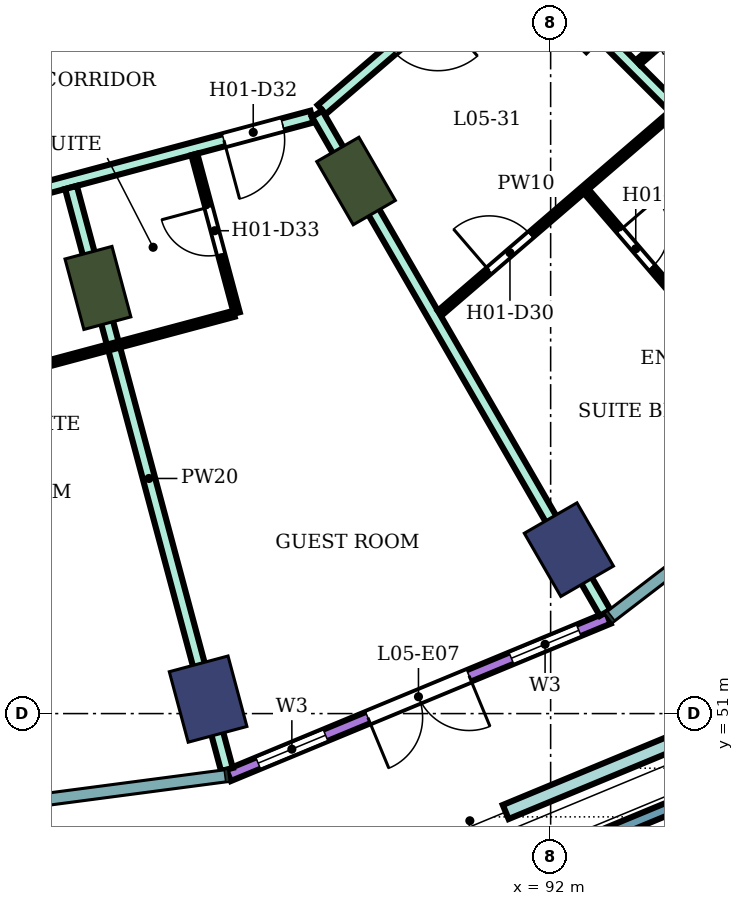
"""IFC4 building model, lengths in metres.
Left out: names, types, materials, properties, quantities, classifications, styles, units other than length and angle.
Written with IfcOpenShell. Run it as: python <this file> out.ifc"""

import sys

from ifc_helpers import new_model, si_unit, direction, frame, frame_2d, origin, origin_2d, place, context, subcontext, project, spatial, rectangle, extrude, element, fill, save


model = new_model("IFC4")
c1 = context("Model", 3, precision=1e-05, world=origin(), true_north=direction((0.0, 1.0)))
c2 = subcontext(c1, "Body", "Model", "MODEL_VIEW")
j1 = project(units=[si_unit("LENGTHUNIT", "METRE"), si_unit("PLANEANGLEUNIT", "RADIAN")], contexts=[c1])
p1 = place(None, origin())
s1 = spatial("IfcSite", under=j1, at=p1, CompositionType="ELEMENT")
p2 = place(p1, origin())
s2 = spatial("IfcBuilding", under=s1, at=p2, CompositionType="ELEMENT")
p3 = place(p2, frame((0.0, 0.0, 28.8)))
s3 = spatial("IfcBuildingStorey", under=s2, at=p3, CompositionType="ELEMENT", Elevation=28.8)
for number, where, z_axis, x_axis in (
    (1, (86.367, 51.238, 0.0), (0.0, 0.0, 1.0), (0.259, -0.966, 0.0)),
    (2, (92.3, 53.696, 0.0), (0.0, 0.0, 1.0), (0.5, -0.866, 0.0)),
):
    element("IfcColumn", number, at=place(p3, frame(where, z_axis=z_axis, x_axis=x_axis)), inside=s3, PredefinedType="COLUMN", context=c2, shape_type="SweptSolid", body=[
        extrude(rectangle(XDim=1.2, YDim=1.0, at=origin_2d()), origin(), (0.0, 0.0, 1.0), 3.8),
    ])
for number, where, z_axis, x_axis in (
    (3, (84.555, 58.0, 0.0), (0.0, 0.0, 1.0), (0.259, -0.966, 0.0)),
    (4, (88.8, 59.758, 0.0), (0.0, 0.0, 1.0), (0.5, -0.866, 0.0)),
    (5, (92.445, 62.555, 0.0), (0.0, 0.0, 1.0), (0.707, -0.707, 0.0)),
):
    element("IfcColumn", number, at=place(p3, frame(where, z_axis=z_axis, x_axis=x_axis)), inside=s3, PredefinedType="COLUMN", context=c2, shape_type="SweptSolid", body=[
        extrude(rectangle(XDim=1.2, YDim=0.8, at=origin_2d()), origin(), (0.0, 0.0, 1.0), 3.8),
    ])
p4 = place(p3, frame((86.703, 49.983, 0.0), z_axis=(0.0, 0.0, 1.0), x_axis=(0.923875115043, 0.382694096902, 0.0)))
e6 = element("IfcWall", 6, at=p4, inside=s3, PredefinedType="NOTDEFINED", context=c2, shape_type="SweptSolid", body=[
    extrude(rectangle(XDim=6.761, YDim=0.2, at=frame_2d((3.38, 0.0))), origin(), (0.0, 0.0, 1.0), 3.8),
])
p5 = place(p4, frame((0.527, 0.0, 0.9)))
e7 = element("IfcOpeningElement", 7, at=p5, cuts=e6, PredefinedType="OPENING", context=c2, shape_type="SweptSolid", body=[
    extrude(rectangle(XDim=1.2, YDim=2.4, at=frame_2d((0.6, 1.2))), frame((0.0, 0.11, 0.0), z_axis=(0.0, -1.0, 0.0), x_axis=(1.0, 0.0, 0.0)), (0.0, 0.0, 1.0), 0.22),
])
p6 = place(p4, frame((2.48, 0.0, 0.0)))
e8 = element("IfcOpeningElement", 8, at=p6, cuts=e6, PredefinedType="OPENING", context=c2, shape_type="SweptSolid", body=[
    extrude(rectangle(XDim=1.8, YDim=2.4, at=frame_2d((0.9, 1.2))), frame((0.0, 0.11, 0.0), z_axis=(0.0, -1.0, 0.0), x_axis=(1.0, 0.0, 0.0)), (0.0, 0.0, 1.0), 0.22),
])
p7 = place(p4, frame((5.034, 0.0, 0.9)))
e9 = element("IfcOpeningElement", 9, at=p7, cuts=e6, PredefinedType="OPENING", context=c2, shape_type="SweptSolid", body=[
    extrude(rectangle(XDim=1.2, YDim=2.4, at=frame_2d((0.6, 1.2))), frame((0.0, 0.11, 0.0), z_axis=(0.0, -1.0, 0.0), x_axis=(1.0, 0.0, 0.0)), (0.0, 0.0, 1.0), 0.22),
])
p8 = place(p3, frame((94.586, 49.709, 0.0), z_axis=(0.0, 0.0, 1.0), x_axis=(-0.923876582616, -0.382690553965, 0.0)))
e10 = element("IfcWall", 10, at=p8, inside=s3, PredefinedType="PARAPET", context=c2, shape_type="SweptSolid", body=[
    extrude(rectangle(XDim=7.595, YDim=0.2, at=frame_2d((3.798, 0.0))), origin(), (0.0, 0.0, 1.0), 1.1),
])
p9 = place(p3, frame((94.094, 50.555, 0.0), z_axis=(0.0, 0.0, 1.0), x_axis=(-0.923849931538, -0.38275488762, 0.0)))
e11 = element("IfcWall", 11, at=p9, inside=s3, PredefinedType="USERDEFINED", context=c2, shape_type="SweptSolid", body=[
    extrude(rectangle(XDim=3.067, YDim=0.25, at=frame_2d((1.533, 0.0))), origin(), (0.0, 0.0, 1.0), 0.6),
])
p10 = place(p3, frame((80.0, 58.655, 0.0), z_axis=(0.0, 0.0, 1.0), x_axis=(0.965974635626, 0.258636817424, 0.0)))
e12 = element("IfcWall", 12, at=p10, inside=s3, PredefinedType="PARTITIONING", context=c2, shape_type="SweptSolid", body=[
    extrude(rectangle(XDim=8.36, YDim=0.2, at=frame_2d((4.18, 0.0))), origin(), (0.0, 0.0, 1.0), 3.35),
])
p11 = place(p10, frame((6.86, 0.0, 0.0)))
e13 = element("IfcOpeningElement", 13, at=p11, cuts=e12, PredefinedType="OPENING", context=c2, shape_type="SweptSolid", body=[
    extrude(rectangle(XDim=1.0, YDim=2.1, at=frame_2d((0.5, 1.05))), frame((0.0, 0.11, 0.0), z_axis=(0.0, -1.0, 0.0), x_axis=(1.0, 0.0, 0.0)), (0.0, 0.0, 1.0), 0.22),
])
p12 = place(p10, frame((0.55, 0.0, 0.0)))
e14 = element("IfcOpeningElement", 14, at=p12, cuts=e12, PredefinedType="OPENING", context=c2, shape_type="SweptSolid", body=[
    extrude(rectangle(XDim=1.0, YDim=2.1, at=frame_2d((0.5, 1.05))), frame((0.0, 0.11, 0.0), z_axis=(0.0, -1.0, 0.0), x_axis=(1.0, 0.0, 0.0)), (0.0, 0.0, 1.0), 0.22),
])
p13 = place(p3, frame((80.0, 61.346, 0.0), z_axis=(0.0, 0.0, 1.0), x_axis=(0.965924181808, 0.258825182312, 0.0)))
e15 = element("IfcWall", 15, at=p13, inside=s3, PredefinedType="PARTITIONING", context=c2, shape_type="SweptSolid", body=[
    extrude(rectangle(XDim=6.94, YDim=0.2, at=frame_2d((3.47, 0.0))), origin(), (0.0, 0.0, 1.0), 3.35),
])
p14 = place(p13, frame((0.55, 0.0, 0.0)))
e16 = element("IfcOpeningElement", 16, at=p14, cuts=e15, PredefinedType="OPENING", context=c2, shape_type="SweptSolid", body=[
    extrude(rectangle(XDim=1.0, YDim=2.1, at=frame_2d((0.5, 1.05))), frame((0.0, 0.11, 0.0), z_axis=(0.0, -1.0, 0.0), x_axis=(1.0, 0.0, 0.0)), (0.0, 0.0, 1.0), 0.22),
])
p15 = place(p3, frame((84.112, 59.652, 0.0), z_axis=(0.0, 0.0, 1.0), x_axis=(0.258791091927, -0.965933315886, 0.0)))
e17 = element("IfcWall", 17, at=p15, inside=s3, PredefinedType="PARTITIONING", context=c2, shape_type="SweptSolid", body=[
    extrude(rectangle(XDim=9.909, YDim=0.2, at=frame_2d((4.955, 0.0))), origin(), (0.0, 0.0, 1.0), 3.35),
])
p16 = place(p3, frame((88.235, 60.931, 0.0), z_axis=(0.0, 0.0, 1.0), x_axis=(0.758799498714, 0.651324282329, 0.0)))
e18 = element("IfcWall", 18, at=p16, inside=s3, PredefinedType="PARTITIONING", context=c2, shape_type="SweptSolid", body=[
    extrude(rectangle(XDim=6.186, YDim=0.2, at=frame_2d((3.093, 0.0))), origin(), (0.0, 0.0, 1.0), 3.35),
])
p17 = place(p16, frame((1.519, 0.0, 0.0)))
e19 = element("IfcOpeningElement", 19, at=p17, cuts=e18, PredefinedType="OPENING", context=c2, shape_type="SweptSolid", body=[
    extrude(rectangle(XDim=1.0, YDim=2.1, at=frame_2d((0.5, 1.05))), frame((0.0, 0.11, 0.0), z_axis=(0.0, -1.0, 0.0), x_axis=(1.0, 0.0, 0.0)), (0.0, 0.0, 1.0), 0.22),
])
p18 = place(p3, frame((88.16, 60.863, 0.0), z_axis=(0.0, 0.0, 1.0), x_axis=(0.499946996988, -0.866056002925, 0.0)))
e20 = element("IfcWall", 20, at=p18, inside=s3, PredefinedType="PARTITIONING", context=c2, shape_type="SweptSolid", body=[
    extrude(rectangle(XDim=9.475, YDim=0.2, at=frame_2d((4.737, 0.0))), origin(), (0.0, 0.0, 1.0), 3.35),
])
p19 = place(p3, frame((91.449, 63.548, 0.0), z_axis=(0.0, 0.0, 1.0), x_axis=(0.706984804638, -0.707228736698, 0.0)))
e21 = element("IfcWall", 21, at=p19, inside=s3, PredefinedType="PARTITIONING", context=c2, shape_type="SweptSolid", body=[
    extrude(rectangle(XDim=7.006, YDim=0.2, at=frame_2d((3.503, 0.0))), origin(), (0.0, 0.0, 1.0), 3.35),
])
p20 = place(p3, frame((82.782, 56.501, 0.0), z_axis=(0.0, 0.0, 1.0), x_axis=(0.965999228418, 0.258544949083, 0.0)))
e22 = element("IfcWall", 22, at=p20, inside=s3, PredefinedType="PARTITIONING", context=c2, shape_type="SweptSolid", body=[
    extrude(rectangle(XDim=4.15, YDim=0.1, at=frame_2d((2.075, 0.0))), origin(), (0.0, 0.0, 1.0), 3.35),
])
p21 = place(p3, frame((86.14, 60.196, 0.0), z_axis=(0.0, 0.0, 1.0), x_axis=(0.258945475746, -0.965891940432, 0.0)))
e23 = element("IfcWall", 23, at=p21, inside=s3, PredefinedType="PARTITIONING", context=c2, shape_type="SweptSolid", body=[
    extrude(rectangle(XDim=2.7, YDim=0.1, at=frame_2d((1.35, 0.0))), origin(), (0.0, 0.0, 1.0), 3.35),
])
p22 = place(p21, frame((0.9, 0.0, 0.0)))
e24 = element("IfcOpeningElement", 24, at=p22, cuts=e23, PredefinedType="OPENING", context=c2, shape_type="SweptSolid", body=[
    extrude(rectangle(XDim=0.8, YDim=2.1, at=frame_2d((0.4, 1.05))), frame((0.0, 0.06, 0.0), z_axis=(0.0, -1.0, 0.0), x_axis=(1.0, 0.0, 0.0)), (0.0, 0.0, 1.0), 0.12),
])
p23 = place(p3, frame((90.178, 57.587, 0.0), z_axis=(0.0, 0.0, 1.0), x_axis=(0.758140003227, 0.652091815243, 0.0)))
e25 = element("IfcWall", 25, at=p23, inside=s3, PredefinedType="PARTITIONING", context=c2, shape_type="SweptSolid", body=[
    extrude(rectangle(XDim=5.021, YDim=0.1, at=frame_2d((2.51, 0.0))), origin(), (0.0, 0.0, 1.0), 3.35),
])
p24 = place(p23, frame((1.071, 0.0, 0.0)))
e26 = element("IfcOpeningElement", 26, at=p24, cuts=e25, PredefinedType="OPENING", context=c2, shape_type="SweptSolid", body=[
    extrude(rectangle(XDim=0.9, YDim=2.1, at=frame_2d((0.45, 1.05))), frame((0.0, 0.06, 0.0), z_axis=(0.0, -1.0, 0.0), x_axis=(1.0, 0.0, 0.0)), (0.0, 0.0, 1.0), 0.12),
])
p25 = place(p3, frame((92.585, 59.591, 0.0), z_axis=(0.0, 0.0, 1.0), x_axis=(0.652011200591, -0.758209334092, 0.0)))
e27 = element("IfcWall", 27, at=p25, inside=s3, PredefinedType="PARTITIONING", context=c2, shape_type="SweptSolid", body=[
    extrude(rectangle(XDim=2.8, YDim=0.1, at=frame_2d((1.4, 0.0))), origin(), (0.0, 0.0, 1.0), 3.35),
])
p26 = place(p25, frame((0.85, 0.0, 0.0)))
e28 = element("IfcOpeningElement", 28, at=p26, cuts=e27, PredefinedType="OPENING", context=c2, shape_type="SweptSolid", body=[
    extrude(rectangle(XDim=0.8, YDim=2.1, at=frame_2d((0.4, 1.05))), frame((0.0, 0.06, 0.0), z_axis=(0.0, -1.0, 0.0), x_axis=(1.0, 0.0, 0.0)), (0.0, 0.0, 1.0), 0.12),
])
p27 = place(p3, frame((93.435, 61.707, 0.0), z_axis=(0.0, 0.0, 1.0), x_axis=(0.758070495124, 0.652172618578, 0.0)))
e29 = element("IfcWall", 29, at=p27, inside=s3, PredefinedType="PARTITIONING", context=c2, shape_type="SweptSolid", body=[
    extrude(rectangle(XDim=1.789, YDim=0.1, at=frame_2d((0.895, 0.0))), origin(), (0.0, 0.0, 1.0), 3.35),
])
p28 = place(p5, origin())
e30 = element("IfcWindow", 30, at=p28, inside=s3, PartitioningType="SINGLE_PANEL", PredefinedType="WINDOW", context=c2, shape_type="SweptSolid", body=[
    extrude(rectangle(XDim=1.2, YDim=2.4, at=frame_2d((0.6, 1.2))), frame((0.0, 0.03, 0.0), z_axis=(0.0, -1.0, 0.0), x_axis=(1.0, 0.0, 0.0)), (0.0, 0.0, 1.0), 0.06),
])
fill(e7, e30)
p29 = place(p6, frame((1.8, 0.0, 0.0), z_axis=(0.0, 0.0, 1.0), x_axis=(-1.0, 0.0, 0.0)))
e31 = element("IfcDoor", 31, at=p29, inside=s3, OperationType="DOUBLE_DOOR_SINGLE_SWING", PredefinedType="DOOR", context=c2, shape_type="SweptSolid", body=[
    extrude(rectangle(XDim=1.8, YDim=2.4, at=frame_2d((0.9, 1.2))), frame((0.0, 0.025, 0.0), z_axis=(0.0, -1.0, 0.0), x_axis=(1.0, 0.0, 0.0)), (0.0, 0.0, 1.0), 0.05),
])
fill(e8, e31)
p30 = place(p7, origin())
e32 = element("IfcWindow", 32, at=p30, inside=s3, PartitioningType="SINGLE_PANEL", PredefinedType="WINDOW", context=c2, shape_type="SweptSolid", body=[
    extrude(rectangle(XDim=1.2, YDim=2.4, at=frame_2d((0.6, 1.2))), frame((0.0, 0.03, 0.0), z_axis=(0.0, -1.0, 0.0), x_axis=(1.0, 0.0, 0.0)), (0.0, 0.0, 1.0), 0.06),
])
fill(e9, e32)
p31 = place(p24, origin())
e33 = element("IfcDoor", 33, at=p31, inside=s3, OperationType="SINGLE_SWING_LEFT", PredefinedType="DOOR", context=c2, shape_type="SweptSolid", body=[
    extrude(rectangle(XDim=0.9, YDim=2.1, at=frame_2d((0.45, 1.05))), frame((0.0, 0.025, 0.0), z_axis=(0.0, -1.0, 0.0), x_axis=(1.0, 0.0, 0.0)), (0.0, 0.0, 1.0), 0.05),
])
fill(e26, e33)
p32 = place(p26, origin())
e34 = element("IfcDoor", 34, at=p32, inside=s3, OperationType="SINGLE_SWING_LEFT", PredefinedType="DOOR", context=c2, shape_type="SweptSolid", body=[
    extrude(rectangle(XDim=0.8, YDim=2.1, at=frame_2d((0.4, 1.05))), frame((0.0, 0.025, 0.0), z_axis=(0.0, -1.0, 0.0), x_axis=(1.0, 0.0, 0.0)), (0.0, 0.0, 1.0), 0.05),
])
fill(e28, e34)
p33 = place(p11, frame((1.0, 0.0, 0.0), z_axis=(0.0, 0.0, 1.0), x_axis=(-1.0, 0.0, 0.0)))
e35 = element("IfcDoor", 35, at=p33, inside=s3, OperationType="SINGLE_SWING_RIGHT", PredefinedType="DOOR", context=c2, shape_type="SweptSolid", body=[
    extrude(rectangle(XDim=1.0, YDim=2.1, at=frame_2d((0.5, 1.05))), frame((0.0, 0.025, 0.0), z_axis=(0.0, -1.0, 0.0), x_axis=(1.0, 0.0, 0.0)), (0.0, 0.0, 1.0), 0.05),
])
fill(e13, e35)
p34 = place(p22, frame((0.8, 0.0, 0.0), z_axis=(0.0, 0.0, 1.0), x_axis=(-1.0, 0.0, 0.0)))
e36 = element("IfcDoor", 36, at=p34, inside=s3, OperationType="SINGLE_SWING_RIGHT", PredefinedType="DOOR", context=c2, shape_type="SweptSolid", body=[
    extrude(rectangle(XDim=0.8, YDim=2.1, at=frame_2d((0.4, 1.05))), frame((0.0, 0.025, 0.0), z_axis=(0.0, -1.0, 0.0), x_axis=(1.0, 0.0, 0.0)), (0.0, 0.0, 1.0), 0.05),
])
fill(e24, e36)
save(model, sys.argv[1])
